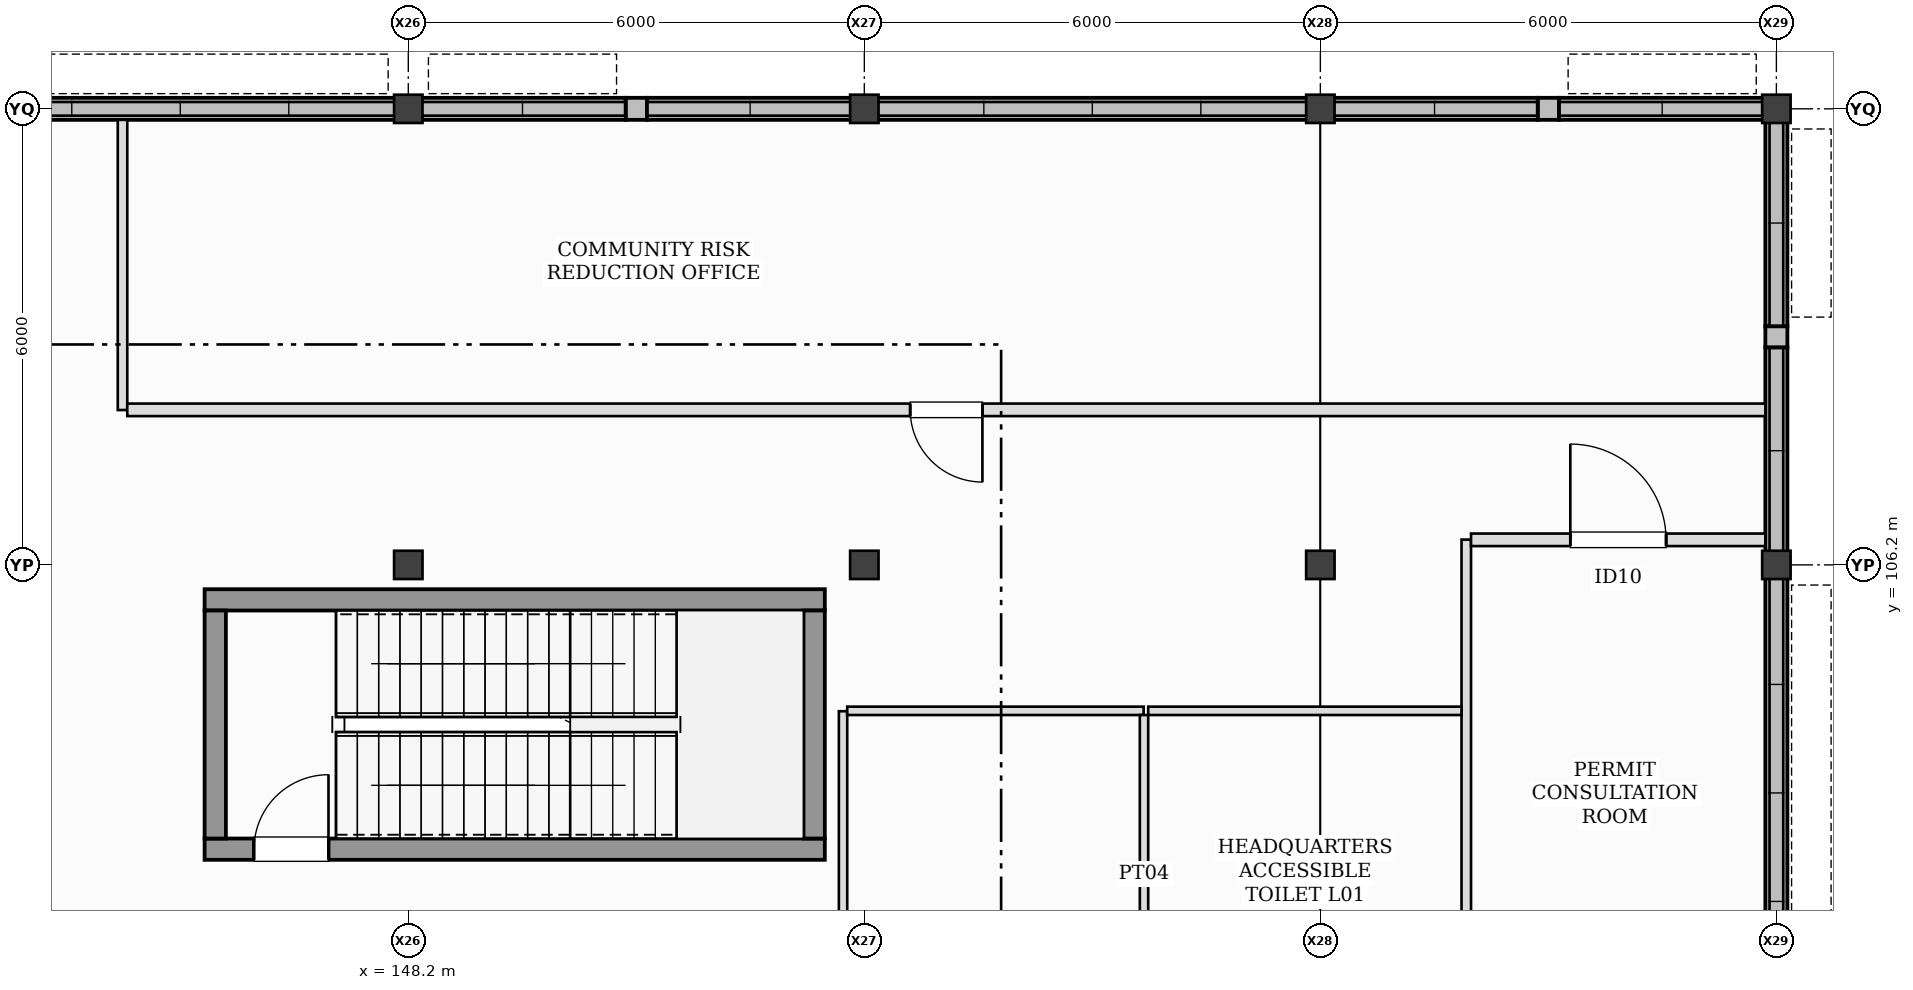
"""IFC4 building model, lengths in metres.
Left out: names, types, materials, properties, quantities, classifications, styles, units other than length and angle.
Written with IfcOpenShell. Run it as: python <this file> out.ifc"""

import sys

from ifc_helpers import new_model, si_unit, direction, frame, frame_2d, origin, origin_2d, place, context, subcontext, project, spatial, rectangle, i_section, extrude, element, fill, save


model = new_model("IFC4")
c1 = context("Model", 3, precision=1e-05, world=origin(), true_north=direction((0.0, 1.0)))
c2 = subcontext(c1, "Body", "Model", "MODEL_VIEW")
j1 = project(units=[si_unit("LENGTHUNIT", "METRE"), si_unit("PLANEANGLEUNIT", "RADIAN")], contexts=[c1])
p1 = place(None, origin())
s1 = spatial("IfcSite", under=j1, at=p1, CompositionType="ELEMENT")
p2 = place(p1, origin())
s2 = spatial("IfcBuilding", under=s1, at=p2, CompositionType="ELEMENT")
p3 = place(p2, origin())
s3 = spatial("IfcBuildingStorey", under=s2, at=p3, CompositionType="ELEMENT", Elevation=0.0)
for number, where, z_axis, x_axis in (
    (1, (148.2, 106.2, 0.0), (0.0, 0.0, 1.0), (1.0, 0.0, 0.0)),
    (2, (148.2, 112.2, 0.0), (0.0, 0.0, 1.0), (1.0, 0.0, 0.0)),
    (3, (154.2, 106.2, 0.0), (0.0, 0.0, 1.0), (1.0, 0.0, 0.0)),
    (4, (154.2, 112.2, 0.0), (0.0, 0.0, 1.0), (1.0, 0.0, 0.0)),
    (5, (160.2, 106.2, 0.0), (0.0, 0.0, 1.0), (1.0, 0.0, 0.0)),
    (6, (160.2, 112.2, 0.0), (0.0, 0.0, 1.0), (1.0, 0.0, 0.0)),
    (7, (166.2, 106.2, 0.0), (0.0, 0.0, 1.0), (1.0, 0.0, 0.0)),
    (8, (166.2, 112.2, 0.0), (0.0, 0.0, 1.0), (1.0, 0.0, 0.0)),
):
    element("IfcColumn", number, at=place(p3, frame(where, z_axis=z_axis, x_axis=x_axis)), inside=s3, PredefinedType="COLUMN", context=c2, shape_type="SweptSolid", body=[
        extrude(i_section(OverallWidth=0.374, OverallDepth=0.372, WebThickness=0.016, FlangeThickness=0.026, at=origin_2d()), origin(), (0.0, 0.0, 1.0), 6.0),
    ])
p4 = place(p3, frame((148.055, 112.2, 0.0), z_axis=(0.0, 0.0, 1.0), x_axis=(-1.0, 0.0, 0.0)))
e9 = element("IfcWall", 9, at=p4, inside=s3, PredefinedType="STANDARD", context=c2, shape_type="SweptSolid", body=[
    extrude(rectangle(XDim=5.71, YDim=0.29, at=frame_2d((2.855, 0.0))), origin(), (0.0, 0.0, 1.0), 0.56),
])
p5 = place(p3, frame((151.34, 112.2, 0.0), z_axis=(0.0, 0.0, 1.0), x_axis=(-1.0, 0.0, 0.0)))
e10 = element("IfcWall", 10, at=p5, inside=s3, PredefinedType="STANDARD", context=c2, shape_type="SweptSolid", body=[
    extrude(rectangle(XDim=0.28, YDim=0.29, at=frame_2d((0.14, 0.0))), origin(), (0.0, 0.0, 1.0), 5.113),
])
p6 = place(p3, frame((154.055, 112.2, 0.0), z_axis=(0.0, 0.0, 1.0), x_axis=(-1.0, 0.0, 0.0)))
e11 = element("IfcWall", 11, at=p6, inside=s3, PredefinedType="STANDARD", context=c2, shape_type="SweptSolid", body=[
    extrude(rectangle(XDim=2.715, YDim=0.29, at=frame_2d((1.357, 0.0))), origin(), (0.0, 0.0, 1.0), 0.68),
])
p7 = place(p3, frame((151.06, 112.2, 0.0), z_axis=(0.0, 0.0, 1.0), x_axis=(-1.0, 0.0, 0.0)))
e12 = element("IfcWall", 12, at=p7, inside=s3, PredefinedType="STANDARD", context=c2, shape_type="SweptSolid", body=[
    extrude(rectangle(XDim=2.715, YDim=0.29, at=frame_2d((1.357, 0.0))), origin(), (0.0, 0.0, 1.0), 0.8),
])
p8 = place(p3, frame((160.055, 112.2, 0.0), z_axis=(0.0, 0.0, 1.0), x_axis=(-1.0, 0.0, 0.0)))
e13 = element("IfcWall", 13, at=p8, inside=s3, PredefinedType="STANDARD", context=c2, shape_type="SweptSolid", body=[
    extrude(rectangle(XDim=5.71, YDim=0.29, at=frame_2d((2.855, 0.0))), origin(), (0.0, 0.0, 1.0), 0.92),
])
p9 = place(p3, frame((163.34, 112.2, 0.0), z_axis=(0.0, 0.0, 1.0), x_axis=(-1.0, 0.0, 0.0)))
e14 = element("IfcWall", 14, at=p9, inside=s3, PredefinedType="STANDARD", context=c2, shape_type="SweptSolid", body=[
    extrude(rectangle(XDim=0.28, YDim=0.29, at=frame_2d((0.14, 0.0))), origin(), (0.0, 0.0, 1.0), 5.113),
])
p10 = place(p3, frame((166.055, 112.2, 0.0), z_axis=(0.0, 0.0, 1.0), x_axis=(-1.0, 0.0, 0.0)))
e15 = element("IfcWall", 15, at=p10, inside=s3, PredefinedType="STANDARD", context=c2, shape_type="SweptSolid", body=[
    extrude(rectangle(XDim=2.715, YDim=0.29, at=frame_2d((1.357, 0.0))), origin(), (0.0, 0.0, 1.0), 0.32),
])
p11 = place(p3, frame((163.06, 112.2, 0.0), z_axis=(0.0, 0.0, 1.0), x_axis=(-1.0, 0.0, 0.0)))
e16 = element("IfcWall", 16, at=p11, inside=s3, PredefinedType="STANDARD", context=c2, shape_type="SweptSolid", body=[
    extrude(rectangle(XDim=2.715, YDim=0.29, at=frame_2d((1.357, 0.0))), origin(), (0.0, 0.0, 1.0), 0.44),
])
p12 = place(p3, frame((166.2, 100.345, 0.0), z_axis=(0.0, 0.0, 1.0), x_axis=(0.0, 1.0, 0.0)))
e17 = element("IfcWall", 17, at=p12, inside=s3, PredefinedType="STANDARD", context=c2, shape_type="SweptSolid", body=[
    extrude(rectangle(XDim=5.71, YDim=0.29, at=frame_2d((2.855, 0.0))), origin(), (0.0, 0.0, 1.0), 0.32),
])
p13 = place(p3, frame((166.2, 109.06, 0.0), z_axis=(0.0, 0.0, 1.0), x_axis=(0.0, 1.0, 0.0)))
e18 = element("IfcWall", 18, at=p13, inside=s3, PredefinedType="STANDARD", context=c2, shape_type="SweptSolid", body=[
    extrude(rectangle(XDim=0.28, YDim=0.29, at=frame_2d((0.14, 0.0))), origin(), (0.0, 0.0, 1.0), 5.044),
])
p14 = place(p3, frame((166.2, 106.345, 0.0), z_axis=(0.0, 0.0, 1.0), x_axis=(0.0, 1.0, 0.0)))
e19 = element("IfcWall", 19, at=p14, inside=s3, PredefinedType="STANDARD", context=c2, shape_type="SweptSolid", body=[
    extrude(rectangle(XDim=2.715, YDim=0.29, at=frame_2d((1.357, 0.0))), origin(), (0.0, 0.0, 1.0), 0.44),
])
p15 = place(p3, frame((166.2, 109.34, 0.0), z_axis=(0.0, 0.0, 1.0), x_axis=(0.0, 1.0, 0.0)))
e20 = element("IfcWall", 20, at=p15, inside=s3, PredefinedType="STANDARD", context=c2, shape_type="SweptSolid", body=[
    extrude(rectangle(XDim=2.715, YDim=0.29, at=frame_2d((1.357, 0.0))), origin(), (0.0, 0.0, 1.0), 0.56),
])
p16 = place(p3, frame((145.52, 102.46, 0.0), z_axis=(0.0, 0.0, 1.0), x_axis=(1.0, 0.0, 0.0)))
e21 = element("IfcWall", 21, at=p16, inside=s3, PredefinedType="SHEAR", context=c2, shape_type="SweptSolid", body=[
    extrude(rectangle(XDim=8.16, YDim=0.28, at=frame_2d((4.08, 0.0))), origin(), (0.0, 0.0, 1.0), 6.0),
])
p17 = place(p16, frame((0.65, 0.0, 0.0)))
e22 = element("IfcOpeningElement", 22, at=p17, cuts=e21, PredefinedType="OPENING", context=c2, shape_type="SweptSolid", body=[
    extrude(rectangle(XDim=0.98, YDim=2.15, at=frame_2d((0.49, 1.075))), frame((0.0, 0.15, 0.0), z_axis=(0.0, -1.0, 0.0), x_axis=(1.0, 0.0, 0.0)), (0.0, 0.0, 1.0), 0.3),
])
p18 = place(p3, frame((153.68, 105.74, 0.0), z_axis=(0.0, 0.0, 1.0), x_axis=(-1.0, 0.0, 0.0)))
e23 = element("IfcWall", 23, at=p18, inside=s3, PredefinedType="SHEAR", context=c2, shape_type="SweptSolid", body=[
    extrude(rectangle(XDim=8.16, YDim=0.28, at=frame_2d((4.08, 0.0))), origin(), (0.0, 0.0, 1.0), 6.0),
])
for number, where, z_axis, x_axis in (
    (24, (145.66, 105.6, 0.0), (0.0, 0.0, 1.0), (0.0, -1.0, 0.0)),
    (25, (153.54, 102.6, 0.0), (0.0, 0.0, 1.0), (0.0, 1.0, 0.0)),
):
    element("IfcWall", number, at=place(p3, frame(where, z_axis=z_axis, x_axis=x_axis)), inside=s3, PredefinedType="SHEAR", context=c2, shape_type="SweptSolid", body=[
        extrude(rectangle(XDim=3.0, YDim=0.28, at=frame_2d((1.5, 0.0))), origin(), (0.0, 0.0, 1.0), 6.0),
    ])
p19 = place(p3, frame((144.44, 108.238, 0.0), z_axis=(0.0, 0.0, 1.0), x_axis=(0.0, 1.0, 0.0)))
e26 = element("IfcWall", 26, at=p19, inside=s3, PredefinedType="PARTITIONING", context=c2, shape_type="SweptSolid", body=[
    extrude(rectangle(XDim=3.817, YDim=0.125, at=frame_2d((1.909, 0.0))), origin(), (0.0, 0.0, 1.0), 5.339),
])
p20 = place(p3, frame((166.055, 108.24, 0.0), z_axis=(0.0, 0.0, 1.0), x_axis=(-1.0, 0.0, 0.0)))
e27 = element("IfcWall", 27, at=p20, inside=s3, PredefinedType="PARTITIONING", context=c2, shape_type="SweptSolid", body=[
    extrude(rectangle(XDim=21.552, YDim=0.165, at=frame_2d((10.776, 0.0))), origin(), (0.0, 0.0, 1.0), 5.68),
])
p21 = place(p20, frame((10.301, 0.0, 0.0)))
e28 = element("IfcOpeningElement", 28, at=p21, cuts=e27, PredefinedType="OPENING", context=c2, shape_type="SweptSolid", body=[
    extrude(rectangle(XDim=0.95, YDim=2.12, at=frame_2d((0.475, 1.06))), frame((0.0, 0.093, 0.0), z_axis=(0.0, -1.0, 0.0), x_axis=(1.0, 0.0, 0.0)), (0.0, 0.0, 1.0), 0.185),
])
p22 = place(p3, frame((153.92, 100.045, 0.0), z_axis=(0.0, 0.0, 1.0), x_axis=(0.0, 1.0, 0.0)))
e29 = element("IfcWall", 29, at=p22, inside=s3, PredefinedType="PARTITIONING", context=c2, shape_type="SweptSolid", body=[
    extrude(rectangle(XDim=4.23, YDim=0.11, at=frame_2d((2.115, 0.0))), origin(), (0.0, 0.0, 1.0), 5.044),
])
p23 = place(p3, frame((153.975, 104.28, 0.0), z_axis=(0.0, 0.0, 1.0), x_axis=(1.0, 0.0, 0.0)))
e30 = element("IfcWall", 30, at=p23, inside=s3, PredefinedType="PARTITIONING", context=c2, shape_type="SweptSolid", body=[
    extrude(rectangle(XDim=3.9, YDim=0.11, at=frame_2d((1.95, 0.0))), origin(), (0.0, 0.0, 1.0), 5.68),
])
p24 = place(p3, frame((157.88, 104.225, 0.0), z_axis=(0.0, 0.0, 1.0), x_axis=(0.0, -1.0, 0.0)))
e31 = element("IfcWall", 31, at=p24, inside=s3, PredefinedType="PARTITIONING", context=c2, shape_type="SweptSolid", body=[
    extrude(rectangle(XDim=4.18, YDim=0.11, at=frame_2d((2.09, 0.0))), origin(), (0.0, 0.0, 1.0), 5.39),
])
p25 = place(p3, frame((162.12, 100.038, 0.0), z_axis=(0.0, 0.0, 1.0), x_axis=(0.0, 1.0, 0.0)))
e32 = element("IfcWall", 32, at=p25, inside=s3, PredefinedType="PARTITIONING", context=c2, shape_type="SweptSolid", body=[
    extrude(rectangle(XDim=6.495, YDim=0.125, at=frame_2d((3.248, 0.0))), origin(), (0.0, 0.0, 1.0), 5.451),
])
p26 = place(p3, frame((162.183, 106.53, 0.0), z_axis=(0.0, 0.0, 1.0), x_axis=(1.0, 0.0, 0.0)))
e33 = element("IfcWall", 33, at=p26, inside=s3, PredefinedType="PARTITIONING", context=c2, shape_type="SweptSolid", body=[
    extrude(rectangle(XDim=3.872, YDim=0.165, at=frame_2d((1.936, 0.0))), origin(), (0.0, 0.0, 1.0), 5.113),
])
p27 = place(p26, frame((1.306, 0.0, 0.0)))
e34 = element("IfcOpeningElement", 34, at=p27, cuts=e33, PredefinedType="OPENING", context=c2, shape_type="SweptSolid", body=[
    extrude(rectangle(XDim=1.26, YDim=2.2, at=frame_2d((0.63, 1.1))), frame((0.0, 0.093, 0.0), z_axis=(0.0, -1.0, 0.0), x_axis=(1.0, 0.0, 0.0)), (0.0, 0.0, 1.0), 0.185),
])
p28 = place(p3, frame((157.935, 104.28, 0.0), z_axis=(0.0, 0.0, 1.0), x_axis=(1.0, 0.0, 0.0)))
e35 = element("IfcWall", 35, at=p28, inside=s3, PredefinedType="PARTITIONING", context=c2, shape_type="SweptSolid", body=[
    extrude(rectangle(XDim=4.123, YDim=0.11, at=frame_2d((2.061, 0.0))), origin(), (0.0, 0.0, 1.0), 5.68),
])
p29 = place(p17, origin())
e36 = element("IfcDoor", 36, at=p29, inside=s3, OperationType="SINGLE_SWING_RIGHT", PredefinedType="DOOR", context=c2, shape_type="SweptSolid", body=[
    extrude(rectangle(XDim=0.98, YDim=2.15, at=frame_2d((0.49, 1.075))), frame((0.0, 0.025, 0.0), z_axis=(0.0, -1.0, 0.0), x_axis=(1.0, 0.0, 0.0)), (0.0, 0.0, 1.0), 0.05),
])
fill(e22, e36)
p30 = place(p21, frame((0.95, 0.0, 0.0), z_axis=(0.0, 0.0, 1.0), x_axis=(-1.0, 0.0, 0.0)))
e37 = element("IfcDoor", 37, at=p30, inside=s3, OperationType="SINGLE_SWING_LEFT", PredefinedType="DOOR", context=c2, shape_type="SweptSolid", body=[
    extrude(rectangle(XDim=0.95, YDim=2.12, at=frame_2d((0.475, 1.06))), frame((0.0, 0.025, 0.0), z_axis=(0.0, -1.0, 0.0), x_axis=(1.0, 0.0, 0.0)), (0.0, 0.0, 1.0), 0.05),
])
fill(e28, e37)
p31 = place(p27, frame((1.26, 0.0, 0.0), z_axis=(0.0, 0.0, 1.0), x_axis=(-1.0, 0.0, 0.0)))
e38 = element("IfcDoor", 38, at=p31, inside=s3, OperationType="SINGLE_SWING_LEFT", PredefinedType="DOOR", context=c2, shape_type="SweptSolid", body=[
    extrude(rectangle(XDim=1.26, YDim=2.2, at=frame_2d((0.63, 1.1))), frame((0.0, 0.025, 0.0), z_axis=(0.0, -1.0, 0.0), x_axis=(1.0, 0.0, 0.0)), (0.0, 0.0, 1.0), 0.05),
])
fill(e34, e38)
save(model, sys.argv[1])
